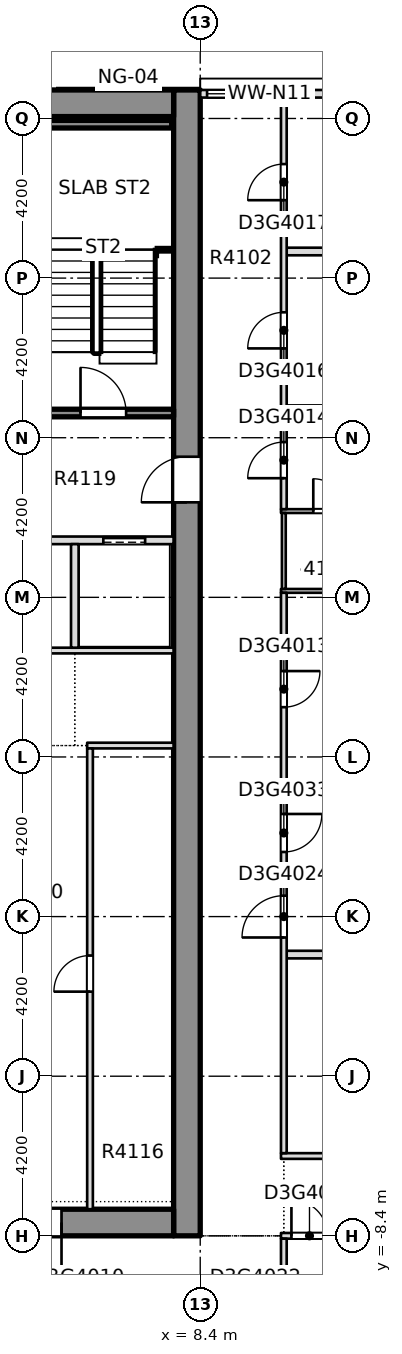
"""IFC4 building model, lengths in metres.
Left out: names, types, materials, properties, quantities, classifications, styles, units other than length and angle.
Written with IfcOpenShell. Run it as: python <this file> out.ifc"""

import sys

from ifc_helpers import new_model, si_unit, direction, frame, frame_2d, origin, place, context, subcontext, project, spatial, rectangle, extrude, element, fill, save


model = new_model("IFC4")
c1 = context("Model", 3, precision=1e-05, world=origin(), true_north=direction((0.0, 1.0)))
c2 = subcontext(c1, "Body", "Model", "MODEL_VIEW")
j1 = project(units=[si_unit("LENGTHUNIT", "METRE"), si_unit("PLANEANGLEUNIT", "RADIAN")], contexts=[c1])
p1 = place(None, origin())
s1 = spatial("IfcSite", under=j1, at=p1, CompositionType="ELEMENT")
p2 = place(p1, origin())
s2 = spatial("IfcBuilding", under=s1, at=p2, CompositionType="ELEMENT")
p3 = place(p2, frame((0.0, 0.0, 160.7)))
s3 = spatial("IfcBuildingStorey", under=s2, at=p3, CompositionType="ELEMENT", Elevation=160.7)
p4 = place(p3, frame((8.05, -8.4, -0.4), z_axis=(0.0, 0.0, 1.0), x_axis=(0.0, 1.0, 0.0)))
e1 = element("IfcWall", 1, at=p4, inside=s3, PredefinedType="SOLIDWALL", context=c2, shape_type="SweptSolid", body=[
    extrude(rectangle(XDim=30.15, YDim=0.7, at=frame_2d((15.075, 0.0))), origin(), (0.0, 0.0, 1.0), 3.45),
])
p5 = place(p4, frame((19.3, 0.0, 0.4)))
e2 = element("IfcOpeningElement", 2, at=p5, cuts=e1, PredefinedType="OPENING", context=c2, shape_type="SweptSolid", body=[
    extrude(rectangle(XDim=1.2, YDim=2.1, at=frame_2d((0.6, 1.05))), frame((0.0, 0.36, 0.0), z_axis=(0.0, -1.0, 0.0), x_axis=(1.0, 0.0, 0.0)), (0.0, 0.0, 1.0), 0.72),
])
p6 = place(p3, frame((-7.7, -8.05, -0.4), z_axis=(0.0, 0.0, 1.0), x_axis=(1.0, 0.0, 0.0)))
e3 = element("IfcWall", 3, at=p6, inside=s3, PredefinedType="SHEAR", context=c2, shape_type="SweptSolid", body=[
    extrude(rectangle(XDim=15.4, YDim=0.7, at=frame_2d((7.7, 0.0))), origin(), (0.0, 0.0, 1.0), 3.45),
])
p7 = place(p6, frame((2.95, 0.0, 0.4)))
e4 = element("IfcOpeningElement", 4, at=p7, cuts=e3, PredefinedType="OPENING", context=c2, shape_type="SweptSolid", body=[
    extrude(rectangle(XDim=1.8, YDim=2.1, at=frame_2d((0.9, 1.05))), frame((0.0, 0.36, 0.0), z_axis=(0.0, -1.0, 0.0), x_axis=(1.0, 0.0, 0.0)), (0.0, 0.0, 1.0), 0.72),
])
p8 = place(p6, frame((10.65, 0.0, 0.4)))
e5 = element("IfcOpeningElement", 5, at=p8, cuts=e3, PredefinedType="OPENING", context=c2, shape_type="SweptSolid", body=[
    extrude(rectangle(XDim=1.8, YDim=2.1, at=frame_2d((0.9, 1.05))), frame((0.0, 0.36, 0.0), z_axis=(0.0, -1.0, 0.0), x_axis=(1.0, 0.0, 0.0)), (0.0, 0.0, 1.0), 0.72),
])
p9 = place(p3, frame((-7.7, 21.4, -0.4), z_axis=(0.0, 0.0, 1.0), x_axis=(1.0, 0.0, 0.0)))
e6 = element("IfcWall", 6, at=p9, inside=s3, PredefinedType="SHEAR", context=c2, shape_type="SweptSolid", body=[
    extrude(rectangle(XDim=15.4, YDim=0.7, at=frame_2d((7.7, 0.0))), origin(), (0.0, 0.0, 1.0), 3.45),
])
p10 = place(p3, frame((10.525, -8.4, 0.0), z_axis=(0.0, 0.0, 1.0), x_axis=(1.0, 0.0, 0.0)))
e7 = element("IfcWall", 7, at=p10, inside=s3, PredefinedType="PARTITIONING", context=c2, shape_type="SweptSolid", body=[
    extrude(rectangle(XDim=11.025, YDim=0.15, at=frame_2d((5.513, 0.0))), origin(), (0.0, 0.0, 1.0), 3.05),
])
p11 = place(p10, frame((0.275, 0.0, 0.0)))
e8 = element("IfcOpeningElement", 8, at=p11, cuts=e7, PredefinedType="OPENING", context=c2, shape_type="SweptSolid", body=[
    extrude(rectangle(XDim=0.95, YDim=2.1, at=frame_2d((0.475, 1.05))), frame((0.0, 0.085, 0.0), z_axis=(0.0, -1.0, 0.0), x_axis=(1.0, 0.0, 0.0)), (0.0, 0.0, 1.0), 0.17),
])
p12 = place(p3, frame((10.525, -6.3, 0.0), z_axis=(0.0, 0.0, 1.0), x_axis=(1.0, 0.0, 0.0)))
e9 = element("IfcWall", 9, at=p12, inside=s3, PredefinedType="PARTITIONING", context=c2, shape_type="SweptSolid", body=[
    extrude(rectangle(XDim=11.025, YDim=0.15, at=frame_2d((5.513, 0.0))), origin(), (0.0, 0.0, 1.0), 3.05),
])
p13 = place(p12, frame((2.7, 0.0, 0.0)))
e10 = element("IfcOpeningElement", 10, at=p13, cuts=e9, PredefinedType="OPENING", context=c2, shape_type="SweptSolid", body=[
    extrude(rectangle(XDim=1.0, YDim=2.1, at=frame_2d((0.5, 1.05))), frame((0.0, 0.085, 0.0), z_axis=(0.0, -1.0, 0.0), x_axis=(1.0, 0.0, 0.0)), (0.0, 0.0, 1.0), 0.17),
])
p14 = place(p12, frame((8.276, 0.0, 0.0)))
e11 = element("IfcOpeningElement", 11, at=p14, cuts=e9, PredefinedType="OPENING", context=c2, shape_type="SweptSolid", body=[
    extrude(rectangle(XDim=1.0, YDim=2.1, at=frame_2d((0.5, 1.05))), frame((0.0, 0.085, 0.0), z_axis=(0.0, -1.0, 0.0), x_axis=(1.0, 0.0, 0.0)), (0.0, 0.0, 1.0), 0.17),
])
for number, where, z_axis, x_axis in (
    (12, (10.675, -1.0, 0.0), (0.0, 0.0, 1.0), (1.0, 0.0, 0.0)),
    (13, (10.675, 1.0, 0.0), (0.0, 0.0, 1.0), (1.0, 0.0, 0.0)),
):
    element("IfcWall", number, at=place(p3, frame(where, z_axis=z_axis, x_axis=x_axis)), inside=s3, PredefinedType="PARTITIONING", context=c2, shape_type="SweptSolid", body=[
        extrude(rectangle(XDim=6.075, YDim=0.2, at=frame_2d((3.038, 0.0))), origin(), (0.0, 0.0, 1.0), 3.05),
    ])
p15 = place(p3, frame((10.675, 3.4, 0.0), z_axis=(0.0, 0.0, 1.0), x_axis=(1.0, 0.0, 0.0)))
e14 = element("IfcWall", 14, at=p15, inside=s3, PredefinedType="SOLIDWALL", context=c2, shape_type="SweptSolid", body=[
    extrude(rectangle(XDim=9.773, YDim=0.2, at=frame_2d((4.886, 0.0))), origin(), (0.0, 0.0, 1.0), 3.05),
])
p16 = place(p3, frame((10.525, 8.57, 0.0), z_axis=(0.0, 0.0, 1.0), x_axis=(1.0, 0.0, 0.0)))
e15 = element("IfcWall", 15, at=p16, inside=s3, PredefinedType="PARTITIONING", context=c2, shape_type="SweptSolid", body=[
    extrude(rectangle(XDim=2.525, YDim=0.1, at=frame_2d((1.263, 0.0))), origin(), (0.0, 0.0, 1.0), 3.05),
])
p17 = place(p3, frame((10.525, 10.67, 0.0), z_axis=(0.0, 0.0, 1.0), x_axis=(1.0, 0.0, 0.0)))
e16 = element("IfcWall", 16, at=p17, inside=s3, PredefinedType="PARTITIONING", context=c2, shape_type="SweptSolid", body=[
    extrude(rectangle(XDim=2.525, YDim=0.1, at=frame_2d((1.263, 0.0))), origin(), (0.0, 0.0, 1.0), 3.05),
])
p18 = place(p17, frame((0.85, 0.0, 0.0)))
e17 = element("IfcOpeningElement", 17, at=p18, cuts=e16, PredefinedType="OPENING", context=c2, shape_type="SweptSolid", body=[
    extrude(rectangle(XDim=0.85, YDim=2.1, at=frame_2d((0.425, 1.05))), frame((0.0, 0.06, 0.0), z_axis=(0.0, -1.0, 0.0), x_axis=(1.0, 0.0, 0.0)), (0.0, 0.0, 1.0), 0.12),
])
for number, where, z_axis, x_axis in (
    (18, (10.675, 13.35, 0.0), (0.0, 0.0, 1.0), (1.0, 0.0, 0.0)),
    (19, (10.675, 17.5, 0.0), (0.0, 0.0, 1.0), (1.0, 0.0, 0.0)),
):
    element("IfcWall", number, at=place(p3, frame(where, z_axis=z_axis, x_axis=x_axis)), inside=s3, PredefinedType="PARTITIONING", context=c2, shape_type="SweptSolid", body=[
        extrude(rectangle(XDim=2.475, YDim=0.2, at=frame_2d((1.237, 0.0))), origin(), (0.0, 0.0, 1.0), 3.05),
    ])
p19 = place(p3, frame((10.6, -10.22, 0.0), z_axis=(0.0, 0.0, 1.0), x_axis=(0.0, 1.0, 0.0)))
e20 = element("IfcWall", 20, at=p19, inside=s3, PredefinedType="PARTITIONING", context=c2, shape_type="SweptSolid", body=[
    extrude(rectangle(XDim=1.745, YDim=0.15, at=frame_2d((0.873, 0.0))), origin(), (0.0, 0.0, 1.0), 3.05),
])
p20 = place(p3, frame((10.6, -6.225, 0.0), z_axis=(0.0, 0.0, 1.0), x_axis=(0.0, 1.0, 0.0)))
e21 = element("IfcWall", 21, at=p20, inside=s3, PredefinedType="PARTITIONING", context=c2, shape_type="SweptSolid", body=[
    extrude(rectangle(XDim=14.745, YDim=0.15, at=frame_2d((7.373, 0.0))), origin(), (0.0, 0.0, 1.0), 3.05),
])
p21 = place(p20, frame((11.735, 0.0, 0.0)))
e22 = element("IfcOpeningElement", 22, at=p21, cuts=e21, PredefinedType="OPENING", context=c2, shape_type="SweptSolid", body=[
    extrude(rectangle(XDim=0.95, YDim=2.1, at=frame_2d((0.475, 1.05))), frame((0.0, 0.085, 0.0), z_axis=(0.0, -1.0, 0.0), x_axis=(1.0, 0.0, 0.0)), (0.0, 0.0, 1.0), 0.17),
])
p22 = place(p20, frame((5.675, 0.0, 0.0)))
e23 = element("IfcOpeningElement", 23, at=p22, cuts=e21, PredefinedType="OPENING", context=c2, shape_type="SweptSolid", body=[
    extrude(rectangle(XDim=1.1, YDim=2.1, at=frame_2d((0.55, 1.05))), frame((0.0, 0.085, 0.0), z_axis=(0.0, -1.0, 0.0), x_axis=(1.0, 0.0, 0.0)), (0.0, 0.0, 1.0), 0.17),
])
p23 = place(p20, frame((7.925, 0.0, 0.0)))
e24 = element("IfcOpeningElement", 24, at=p23, cuts=e21, PredefinedType="OPENING", context=c2, shape_type="SweptSolid", body=[
    extrude(rectangle(XDim=1.0, YDim=2.1, at=frame_2d((0.5, 1.05))), frame((0.0, 0.085, 0.0), z_axis=(0.0, -1.0, 0.0), x_axis=(1.0, 0.0, 0.0)), (0.0, 0.0, 1.0), 0.17),
])
p24 = place(p3, frame((10.6, 8.62, 0.0), z_axis=(0.0, 0.0, 1.0), x_axis=(0.0, 1.0, 0.0)))
e25 = element("IfcWall", 25, at=p24, inside=s3, PredefinedType="PARTITIONING", context=c2, shape_type="SweptSolid", body=[
    extrude(rectangle(XDim=2.0, YDim=0.1, at=frame_2d((1.0, 0.0))), origin(), (0.0, 0.0, 1.0), 3.05),
])
p25 = place(p3, frame((10.6, 10.72, 0.0), z_axis=(0.0, 0.0, 1.0), x_axis=(0.0, 1.0, 0.0)))
e26 = element("IfcWall", 26, at=p25, inside=s3, PredefinedType="PARTITIONING", context=c2, shape_type="SweptSolid", body=[
    extrude(rectangle(XDim=10.83, YDim=0.15, at=frame_2d((5.415, 0.0))), origin(), (0.0, 0.0, 1.0), 3.05),
])
p26 = place(p25, frame((0.815, 0.0, 0.0)))
e27 = element("IfcOpeningElement", 27, at=p26, cuts=e26, PredefinedType="OPENING", context=c2, shape_type="SweptSolid", body=[
    extrude(rectangle(XDim=0.95, YDim=2.1, at=frame_2d((0.475, 1.05))), frame((0.0, 0.085, 0.0), z_axis=(0.0, -1.0, 0.0), x_axis=(1.0, 0.0, 0.0)), (0.0, 0.0, 1.0), 0.17),
])
p27 = place(p25, frame((4.23, 0.0, 0.0)))
e28 = element("IfcOpeningElement", 28, at=p27, cuts=e26, PredefinedType="OPENING", context=c2, shape_type="SweptSolid", body=[
    extrude(rectangle(XDim=0.95, YDim=2.1, at=frame_2d((0.475, 1.05))), frame((0.0, 0.085, 0.0), z_axis=(0.0, -1.0, 0.0), x_axis=(1.0, 0.0, 0.0)), (0.0, 0.0, 1.0), 0.17),
])
p28 = place(p25, frame((8.13, 0.0, 0.0)))
e29 = element("IfcOpeningElement", 29, at=p28, cuts=e26, PredefinedType="OPENING", context=c2, shape_type="SweptSolid", body=[
    extrude(rectangle(XDim=0.95, YDim=2.1, at=frame_2d((0.475, 1.05))), frame((0.0, 0.085, 0.0), z_axis=(0.0, -1.0, 0.0), x_axis=(1.0, 0.0, 0.0)), (0.0, 0.0, 1.0), 0.17),
])
p29 = place(p3, frame((12.05, 21.65, 0.0), z_axis=(0.0, 0.0, 1.0), x_axis=(-1.0, 0.0, 0.0)))
e30 = element("IfcWall", 30, at=p29, inside=s3, PredefinedType="STANDARD", context=c2, shape_type="SweptSolid", body=[
    extrude(rectangle(XDim=3.65, YDim=0.2, at=frame_2d((1.825, 0.0))), origin(), (0.0, 0.0, 1.0), 3.05),
])
p30 = place(p29, frame((1.67, 0.0, 0.2)))
e31 = element("IfcOpeningElement", 31, at=p30, cuts=e30, PredefinedType="OPENING", context=c2, shape_type="SweptSolid", body=[
    extrude(rectangle(XDim=1.8, YDim=2.65, at=frame_2d((0.9, 1.325))), frame((0.0, 0.11, 0.0), z_axis=(0.0, -1.0, 0.0), x_axis=(1.0, 0.0, 0.0)), (0.0, 0.0, 1.0), 0.22),
])
p31 = place(p3, frame((5.425, 4.5, 0.0), z_axis=(0.0, 0.0, 1.0), x_axis=(1.0, 0.0, 0.0)))
e32 = element("IfcWall", 32, at=p31, inside=s3, PredefinedType="PARTITIONING", context=c2, shape_type="SweptSolid", body=[
    extrude(rectangle(XDim=2.274, YDim=0.15, at=frame_2d((1.137, 0.0))), origin(), (0.0, 0.0, 1.0), 3.05),
])
p32 = place(p3, frame((-7.699, 7.0, 0.0), z_axis=(0.0, 0.0, 1.0), x_axis=(1.0, 0.0, 0.0)))
e33 = element("IfcWall", 33, at=p32, inside=s3, PredefinedType="PARTITIONING", context=c2, shape_type="SweptSolid", body=[
    extrude(rectangle(XDim=15.398, YDim=0.15, at=frame_2d((7.699, 0.0))), origin(), (0.0, 0.0, 1.0), 3.05),
])
p33 = place(p32, frame((6.999, 0.0, 0.0)))
e34 = element("IfcOpeningElement", 34, at=p33, cuts=e33, PredefinedType="OPENING", context=c2, shape_type="SweptSolid", body=[
    extrude(rectangle(XDim=1.4, YDim=2.1, at=frame_2d((0.7, 1.05))), frame((0.0, 0.085, 0.0), z_axis=(0.0, -1.0, 0.0), x_axis=(1.0, 0.0, 0.0)), (0.0, 0.0, 1.0), 0.17),
])
p34 = place(p3, frame((3.6, 9.9, 0.0), z_axis=(0.0, 0.0, 1.0), x_axis=(1.0, 0.0, 0.0)))
e35 = element("IfcWall", 35, at=p34, inside=s3, PredefinedType="PARTITIONING", context=c2, shape_type="SweptSolid", body=[
    extrude(rectangle(XDim=4.099, YDim=0.2, at=frame_2d((2.049, 0.0))), origin(), (0.0, 0.0, 1.0), 3.05),
])
p35 = place(p34, frame((2.25, 0.0, 0.0)))
e36 = element("IfcOpeningElement", 36, at=p35, cuts=e35, PredefinedType="OPENING", context=c2, shape_type="SweptSolid", body=[
    extrude(rectangle(XDim=1.1, YDim=2.1, at=frame_2d((0.55, 1.05))), frame((0.0, 0.11, 0.0), z_axis=(0.0, -1.0, 0.0), x_axis=(1.0, 0.0, 0.0)), (0.0, 0.0, 1.0), 0.22),
])
p36 = place(p3, frame((3.425, 13.25, 0.0), z_axis=(0.0, 0.0, 1.0), x_axis=(1.0, 0.0, 0.0)))
e37 = element("IfcWall", 37, at=p36, inside=s3, PredefinedType="SOLIDWALL", context=c2, shape_type="SweptSolid", body=[
    extrude(rectangle(XDim=4.274, YDim=0.2, at=frame_2d((2.137, 0.0))), origin(), (0.0, 0.0, 1.0), 3.05),
])
p37 = place(p36, frame((1.825, 0.0, 0.0)))
e38 = element("IfcOpeningElement", 38, at=p37, cuts=e37, PredefinedType="OPENING", context=c2, shape_type="SweptSolid", body=[
    extrude(rectangle(XDim=1.2, YDim=2.1, at=frame_2d((0.6, 1.05))), frame((0.0, 0.11, 0.0), z_axis=(0.0, -1.0, 0.0), x_axis=(1.0, 0.0, 0.0)), (0.0, 0.0, 1.0), 0.22),
])
p38 = place(p3, frame((5.1, 7.075, 0.0), z_axis=(0.0, 0.0, 1.0), x_axis=(0.0, 1.0, 0.0)))
e39 = element("IfcWall", 39, at=p38, inside=s3, PredefinedType="PARTITIONING", context=c2, shape_type="SweptSolid", body=[
    extrude(rectangle(XDim=2.725, YDim=0.2, at=frame_2d((1.363, 0.0))), origin(), (0.0, 0.0, 1.0), 3.05),
])
p39 = place(p3, frame((5.5, -7.699, 0.0), z_axis=(0.0, 0.0, 1.0), x_axis=(0.0, 1.0, 0.0)))
e40 = element("IfcWall", 40, at=p39, inside=s3, PredefinedType="PARTITIONING", context=c2, shape_type="SweptSolid", body=[
    extrude(rectangle(XDim=12.124, YDim=0.15, at=frame_2d((6.062, 0.0))), origin(), (0.0, 0.0, 1.0), 3.05),
])
p40 = place(p39, frame((5.724, 0.0, 0.0)))
e41 = element("IfcOpeningElement", 41, at=p40, cuts=e40, PredefinedType="OPENING", context=c2, shape_type="SweptSolid", body=[
    extrude(rectangle(XDim=0.95, YDim=2.1, at=frame_2d((0.475, 1.05))), frame((0.0, 0.085, 0.0), z_axis=(0.0, -1.0, 0.0), x_axis=(1.0, 0.0, 0.0)), (0.0, 0.0, 1.0), 0.17),
])
p41 = place(p3, frame((4.1, 20.85, 0.0), z_axis=(0.0, 0.0, 1.0), x_axis=(1.0, 0.0, 0.0)))
e42 = element("IfcWall", 42, at=p41, inside=s3, PredefinedType="SOLIDWALL", context=c2, shape_type="SweptSolid", body=[
    extrude(rectangle(XDim=3.55, YDim=0.2, at=frame_2d((1.775, 0.0))), origin(), (0.0, 0.0, 1.0), 3.05),
])
p42 = place(p11, origin())
e43 = element("IfcDoor", 43, at=p42, inside=s3, OperationType="SINGLE_SWING_RIGHT", PredefinedType="DOOR", context=c2, shape_type="SweptSolid", body=[
    extrude(rectangle(XDim=0.95, YDim=2.1, at=frame_2d((0.475, 1.05))), frame((0.0, 0.025, 0.0), z_axis=(0.0, -1.0, 0.0), x_axis=(1.0, 0.0, 0.0)), (0.0, 0.0, 1.0), 0.05),
])
fill(e8, e43)
p43 = place(p21, origin())
e44 = element("IfcDoor", 44, at=p43, inside=s3, OperationType="SINGLE_SWING_LEFT", PredefinedType="DOOR", context=c2, shape_type="SweptSolid", body=[
    extrude(rectangle(XDim=0.95, YDim=2.1, at=frame_2d((0.475, 1.05))), frame((0.0, 0.025, 0.0), z_axis=(0.0, -1.0, 0.0), x_axis=(1.0, 0.0, 0.0)), (0.0, 0.0, 1.0), 0.05),
])
fill(e22, e44)
p44 = place(p26, origin())
e45 = element("IfcDoor", 45, at=p44, inside=s3, OperationType="SINGLE_SWING_RIGHT", PredefinedType="DOOR", context=c2, shape_type="SweptSolid", body=[
    extrude(rectangle(XDim=0.95, YDim=2.1, at=frame_2d((0.475, 1.05))), frame((0.0, 0.025, 0.0), z_axis=(0.0, -1.0, 0.0), x_axis=(1.0, 0.0, 0.0)), (0.0, 0.0, 1.0), 0.05),
])
fill(e27, e45)
p45 = place(p18, origin())
e46 = element("IfcDoor", 46, at=p45, inside=s3, OperationType="SINGLE_SWING_RIGHT", PredefinedType="DOOR", context=c2, shape_type="SweptSolid", body=[
    extrude(rectangle(XDim=0.85, YDim=2.1, at=frame_2d((0.425, 1.05))), frame((0.0, 0.025, 0.0), z_axis=(0.0, -1.0, 0.0), x_axis=(1.0, 0.0, 0.0)), (0.0, 0.0, 1.0), 0.05),
])
fill(e17, e46)
p46 = place(p27, origin())
e47 = element("IfcDoor", 47, at=p46, inside=s3, OperationType="SINGLE_SWING_RIGHT", PredefinedType="DOOR", context=c2, shape_type="SweptSolid", body=[
    extrude(rectangle(XDim=0.95, YDim=2.1, at=frame_2d((0.475, 1.05))), frame((0.0, 0.025, 0.0), z_axis=(0.0, -1.0, 0.0), x_axis=(1.0, 0.0, 0.0)), (0.0, 0.0, 1.0), 0.05),
])
fill(e28, e47)
p47 = place(p28, origin())
e48 = element("IfcDoor", 48, at=p47, inside=s3, OperationType="SINGLE_SWING_LEFT", PredefinedType="DOOR", context=c2, shape_type="SweptSolid", body=[
    extrude(rectangle(XDim=0.95, YDim=2.1, at=frame_2d((0.475, 1.05))), frame((0.0, 0.025, 0.0), z_axis=(0.0, -1.0, 0.0), x_axis=(1.0, 0.0, 0.0)), (0.0, 0.0, 1.0), 0.05),
])
fill(e29, e48)
p48 = place(p22, origin())
e49 = element("IfcDoor", 49, at=p48, inside=s3, OperationType="SINGLE_SWING_LEFT", PredefinedType="DOOR", context=c2, shape_type="SweptSolid", body=[
    extrude(rectangle(XDim=1.1, YDim=2.1, at=frame_2d((0.55, 1.05))), frame((0.0, 0.025, 0.0), z_axis=(0.0, -1.0, 0.0), x_axis=(1.0, 0.0, 0.0)), (0.0, 0.0, 1.0), 0.05),
])
fill(e23, e49)
p49 = place(p23, origin())
e50 = element("IfcDoor", 50, at=p49, inside=s3, OperationType="SINGLE_SWING_RIGHT", PredefinedType="DOOR", context=c2, shape_type="SweptSolid", body=[
    extrude(rectangle(XDim=1.0, YDim=2.1, at=frame_2d((0.5, 1.05))), frame((0.0, 0.025, 0.0), z_axis=(0.0, -1.0, 0.0), x_axis=(1.0, 0.0, 0.0)), (0.0, 0.0, 1.0), 0.05),
])
fill(e24, e50)
p50 = place(p30, origin())
e51 = element("IfcWindow", 51, at=p50, inside=s3, PartitioningType="SINGLE_PANEL", PredefinedType="WINDOW", context=c2, shape_type="SweptSolid", body=[
    extrude(rectangle(XDim=1.8, YDim=2.65, at=frame_2d((0.9, 1.325))), frame((0.0, 0.03, 0.0), z_axis=(0.0, -1.0, 0.0), x_axis=(1.0, 0.0, 0.0)), (0.0, 0.0, 1.0), 0.06),
])
fill(e31, e51)
p51 = place(p40, origin())
e52 = element("IfcDoor", 52, at=p51, inside=s3, OperationType="SINGLE_SWING_LEFT", PredefinedType="DOOR", context=c2, shape_type="SweptSolid", body=[
    extrude(rectangle(XDim=0.95, YDim=2.1, at=frame_2d((0.475, 1.05))), frame((0.0, 0.025, 0.0), z_axis=(0.0, -1.0, 0.0), x_axis=(1.0, 0.0, 0.0)), (0.0, 0.0, 1.0), 0.05),
])
fill(e41, e52)
p52 = place(p37, origin())
e53 = element("IfcDoor", 53, at=p52, inside=s3, OperationType="SINGLE_SWING_RIGHT", PredefinedType="DOOR", context=c2, shape_type="SweptSolid", body=[
    extrude(rectangle(XDim=1.2, YDim=2.1, at=frame_2d((0.6, 1.05))), frame((0.0, 0.025, 0.0), z_axis=(0.0, -1.0, 0.0), x_axis=(1.0, 0.0, 0.0)), (0.0, 0.0, 1.0), 0.05),
])
fill(e38, e53)
p53 = place(p35, origin())
e54 = element("IfcDoor", 54, at=p53, inside=s3, OperationType="SLIDING_TO_LEFT", PredefinedType="DOOR", context=c2, shape_type="SweptSolid", body=[
    extrude(rectangle(XDim=1.1, YDim=2.1, at=frame_2d((0.55, 1.05))), frame((0.0, 0.025, 0.0), z_axis=(0.0, -1.0, 0.0), x_axis=(1.0, 0.0, 0.0)), (0.0, 0.0, 1.0), 0.05),
])
fill(e36, e54)
p54 = place(p8, origin())
e55 = element("IfcDoor", 55, at=p54, inside=s3, OperationType="SINGLE_SWING_LEFT", PredefinedType="DOOR", context=c2, shape_type="SweptSolid", body=[
    extrude(rectangle(XDim=1.8, YDim=2.1, at=frame_2d((0.9, 1.05))), frame((0.0, 0.025, 0.0), z_axis=(0.0, -1.0, 0.0), x_axis=(1.0, 0.0, 0.0)), (0.0, 0.0, 1.0), 0.05),
])
fill(e5, e55)
p55 = place(p5, origin())
e56 = element("IfcDoor", 56, at=p55, inside=s3, OperationType="SINGLE_SWING_LEFT", PredefinedType="DOOR", context=c2, shape_type="SweptSolid", body=[
    extrude(rectangle(XDim=1.2, YDim=2.1, at=frame_2d((0.6, 1.05))), frame((0.0, 0.025, 0.0), z_axis=(0.0, -1.0, 0.0), x_axis=(1.0, 0.0, 0.0)), (0.0, 0.0, 1.0), 0.05),
])
fill(e2, e56)
save(model, sys.argv[1])
